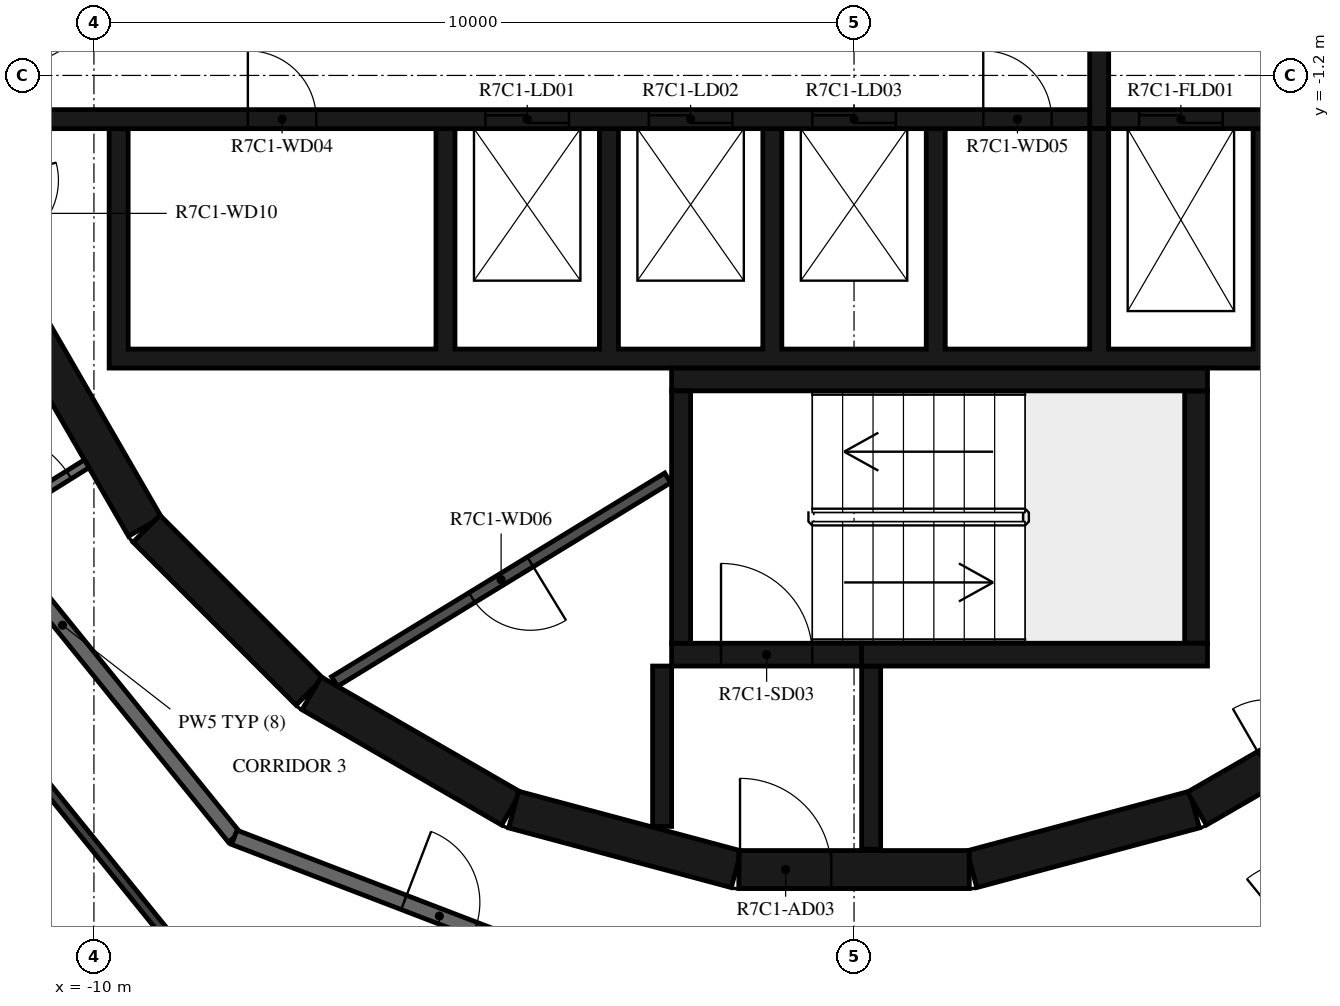
"""IFC4 building model, lengths in metres.
Left out: names, types, materials, properties, quantities, classifications, styles, units other than length and angle.
Written with IfcOpenShell. Run it as: python <this file> out.ifc"""

import sys

from ifc_helpers import new_model, si_unit, direction, frame, frame_2d, origin, place, context, subcontext, project, spatial, polyline, rectangle, outline, extrude, element, fill, save


model = new_model("IFC4")
c1 = context("Model", 3, precision=1e-05, world=origin(), true_north=direction((0.0, 1.0)))
c2 = subcontext(c1, "Body", "Model", "MODEL_VIEW")
j1 = project(units=[si_unit("LENGTHUNIT", "METRE"), si_unit("PLANEANGLEUNIT", "RADIAN")], contexts=[c1])
p1 = place(None, origin())
s1 = spatial("IfcSite", under=j1, at=p1, CompositionType="ELEMENT")
p2 = place(p1, origin())
s2 = spatial("IfcBuilding", under=s1, at=p2, CompositionType="ELEMENT")
p3 = place(p2, frame((0.0, 0.0, 287.9)))
s3 = spatial("IfcBuildingStorey", under=s2, at=p3, CompositionType="ELEMENT", Elevation=287.9)
p4 = place(p3, frame((1.55, -11.643, 0.0), z_axis=(0.0, 0.0, 1.0), x_axis=(0.965948410781, 0.258734743916, 0.0)))
e1 = element("IfcWall", 1, at=p4, inside=s3, PredefinedType="SHEAR", context=c2, shape_type="SweptSolid", body=[
    extrude(rectangle(XDim=3.033, YDim=0.5, at=frame_2d((1.516, 0.0))), origin(), (0.0, 0.0, 1.0), 3.05),
])
p5 = place(p3, frame((4.51, -10.845, 0.0), z_axis=(0.0, 0.0, 1.0), x_axis=(0.865975092491, 0.500087131594, 0.0)))
e2 = element("IfcWall", 2, at=p5, inside=s3, PredefinedType="SHEAR", context=c2, shape_type="SweptSolid", body=[
    extrude(rectangle(XDim=3.033, YDim=0.5, at=frame_2d((1.516, 0.0))), origin(), (0.0, 0.0, 1.0), 3.05),
])
p6 = place(p5, frame((1.066, 0.0, 0.0)))
e3 = element("IfcOpeningElement", 3, at=p6, cuts=e2, PredefinedType="OPENING", context=c2, shape_type="SweptSolid", body=[
    extrude(rectangle(XDim=0.9, YDim=2.1, at=frame_2d((0.45, 1.05))), frame((0.0, 0.26, 0.0), z_axis=(0.0, -1.0, 0.0), x_axis=(1.0, 0.0, 0.0)), (0.0, 0.0, 1.0), 0.52),
])
p7 = place(p3, frame((-10.845, -4.51, 0.0), z_axis=(0.0, 0.0, 1.0), x_axis=(0.500087131594, -0.865975092491, 0.0)))
e4 = element("IfcWall", 4, at=p7, inside=s3, PredefinedType="SHEAR", context=c2, shape_type="SweptSolid", body=[
    extrude(rectangle(XDim=3.033, YDim=0.5, at=frame_2d((1.516, 0.0))), origin(), (0.0, 0.0, 1.0), 3.05),
])
p8 = place(p3, frame((-9.308, -7.164, 0.0), z_axis=(0.0, 0.0, 1.0), x_axis=(0.707106781187, -0.707106781187, 0.0)))
e5 = element("IfcWall", 5, at=p8, inside=s3, PredefinedType="SHEAR", context=c2, shape_type="SweptSolid", body=[
    extrude(rectangle(XDim=3.032, YDim=0.5, at=frame_2d((1.516, 0.0))), origin(), (0.0, 0.0, 1.0), 3.05),
])
for number, where, z_axis, x_axis in (
    (6, (-7.137, -9.329, 0.0), (0.0, 0.0, 1.0), (0.866, -0.5, 0.0)),
    (7, (-4.479, -10.858, 0.0), (0.0, 0.0, 1.0), (0.966, -0.259, 0.0)),
):
    element("IfcWall", number, at=place(p3, frame(where, z_axis=z_axis, x_axis=x_axis)), inside=s3, PredefinedType="SHEAR", context=c2, shape_type="SweptSolid", body=[
        extrude(rectangle(XDim=3.033, YDim=0.5, at=frame_2d((1.516, 0.0))), origin(), (0.0, 0.0, 1.0), 3.05),
    ])
p9 = place(p3, frame((-1.516, -11.647, 0.0), z_axis=(0.0, 0.0, 1.0), x_axis=(1.0, 0.0, 0.0)))
e8 = element("IfcWall", 8, at=p9, inside=s3, PredefinedType="SHEAR", context=c2, shape_type="SweptSolid", body=[
    extrude(rectangle(XDim=3.033, YDim=0.5, at=frame_2d((1.516, 0.0))), origin(), (0.0, 0.0, 1.0), 3.05),
])
p10 = place(p9, frame((0.016, 0.0, 0.0)))
e9 = element("IfcOpeningElement", 9, at=p10, cuts=e8, PredefinedType="OPENING", context=c2, shape_type="SweptSolid", body=[
    extrude(rectangle(XDim=1.2, YDim=2.1, at=frame_2d((0.6, 1.05))), frame((0.0, 0.26, 0.0), z_axis=(0.0, -1.0, 0.0), x_axis=(1.0, 0.0, 0.0)), (0.0, 0.0, 1.0), 0.52),
])
p11 = place(p3, frame((-2.275, -8.67, 0.0), z_axis=(0.0, 0.0, 1.0), x_axis=(0.0, 1.0, 0.0)))
e10 = element("IfcWall", 10, at=p11, inside=s3, PredefinedType="SHEAR", context=c2, shape_type="SweptSolid", body=[
    extrude(rectangle(XDim=3.32, YDim=0.25, at=frame_2d((1.66, 0.0))), origin(), (0.0, 0.0, 1.0), 3.05),
])
p12 = place(p3, frame((-2.4, -5.2, 0.0), z_axis=(0.0, 0.0, 1.0), x_axis=(1.0, 0.0, 0.0)))
e11 = element("IfcWall", 11, at=p12, inside=s3, PredefinedType="SHEAR", context=c2, shape_type="SweptSolid", body=[
    extrude(rectangle(XDim=7.05, YDim=0.3, at=frame_2d((3.525, 0.0))), origin(), (0.0, 0.0, 1.0), 3.05),
])
p13 = place(p3, frame((4.5, -8.67, 0.0), z_axis=(0.0, 0.0, 1.0), x_axis=(0.0, 1.0, 0.0)))
e12 = element("IfcWall", 12, at=p13, inside=s3, PredefinedType="SHEAR", context=c2, shape_type="SweptSolid", body=[
    extrude(rectangle(XDim=3.32, YDim=0.3, at=frame_2d((1.66, 0.0))), origin(), (0.0, 0.0, 1.0), 3.05),
])
p14 = place(p3, frame((0.1, -8.82, 0.0), z_axis=(0.0, 0.0, 1.0), x_axis=(1.0, 0.0, 0.0)))
e13 = element("IfcWall", 13, at=p14, inside=s3, PredefinedType="SHEAR", context=c2, shape_type="SweptSolid", body=[
    extrude(rectangle(XDim=4.55, YDim=0.3, at=frame_2d((2.275, 0.0))), origin(), (0.0, 0.0, 1.0), 3.05),
])
p15 = place(p3, frame((-2.4, -8.82, 0.0), z_axis=(0.0, 0.0, 1.0), x_axis=(1.0, 0.0, 0.0)))
e14 = element("IfcWall", 14, at=p15, inside=s3, PredefinedType="SHEAR", context=c2, shape_type="SweptSolid", body=[
    extrude(rectangle(XDim=2.5, YDim=0.3, at=frame_2d((1.25, 0.0))), origin(), (0.0, 0.0, 1.0), 3.05),
])
p16 = place(p15, frame((0.65, 0.0, 0.0)))
e15 = element("IfcOpeningElement", 15, at=p16, cuts=e14, PredefinedType="OPENING", context=c2, shape_type="SweptSolid", body=[
    extrude(rectangle(XDim=1.2, YDim=2.1, at=frame_2d((0.6, 1.05))), frame((0.0, 0.16, 0.0), z_axis=(0.0, -1.0, 0.0), x_axis=(1.0, 0.0, 0.0)), (0.0, 0.0, 1.0), 0.32),
])
p17 = place(p3, frame((-2.525, -8.97, 0.0), z_axis=(0.0, 0.0, 1.0), x_axis=(0.0, -1.0, 0.0)))
e16 = element("IfcWall", 16, at=p17, inside=s3, PredefinedType="SHEAR", context=c2, shape_type="SweptSolid", body=[
    extrude(rectangle(XDim=2.11, YDim=0.25, at=frame_2d((1.055, 0.0))), origin(), (0.0, 0.0, 1.0), 3.05),
])
p18 = place(p3, frame((0.225, -8.97, 0.0), z_axis=(0.0, 0.0, 1.0), x_axis=(0.0, -1.0, 0.0)))
e17 = element("IfcWall", 17, at=p18, inside=s3, PredefinedType="SHEAR", context=c2, shape_type="SweptSolid", body=[
    extrude(rectangle(XDim=2.41, YDim=0.25, at=frame_2d((1.205, 0.0))), origin(), (0.0, 0.0, 1.0), 3.05),
])
p19 = place(p3, origin())
e18 = element("IfcWall", 18, at=p19, inside=s3, PredefinedType="SHEAR", context=c2, shape_type="SweptSolid", body=[
    extrude(outline(polyline([(9.8, -5.05), (9.8, -4.8), (9.8, -1.9), (9.55, -1.9), (9.55, -4.8), (7.65, -4.8), (7.65, -1.9), (7.4, -1.9), (7.4, -4.8), (5.5, -4.8), (5.5, -1.9), (5.25, -1.9), (5.25, -4.8), (3.35, -4.8), (3.35, -1.9), (3.1, -1.9), (3.1, -4.8), (1.2, -4.8), (1.2, -1.9), (0.95, -1.9), (0.95, -4.8), (-0.95, -4.8), (-0.95, -1.9), (-1.2, -1.9), (-1.2, -4.8), (-3.1, -4.8), (-3.1, -1.9), (-3.35, -1.9), (-3.35, -4.8), (-5.25, -4.8), (-5.25, -1.9), (-5.5, -1.9), (-5.5, -4.8), (-9.55, -4.8), (-9.55, -1.9), (-9.8, -1.9), (-9.8, -4.8), (-9.8, -5.05), (9.8, -5.05)])), origin(), (0.0, 0.0, 1.0), 3.05),
])
p20 = place(p3, frame((-11.28, -1.775, 0.0), z_axis=(0.0, 0.0, 1.0), x_axis=(1.0, 0.0, 0.0)))
e19 = element("IfcWall", 19, at=p20, inside=s3, PredefinedType="SHEAR", context=c2, shape_type="SweptSolid", body=[
    extrude(rectangle(XDim=14.38, YDim=0.25, at=frame_2d((7.19, 0.0))), origin(), (0.0, 0.0, 1.0), 3.05),
])
p21 = place(p20, frame((6.43, 0.0, 0.0)))
e20 = element("IfcOpeningElement", 20, at=p21, cuts=e19, PredefinedType="OPENING", context=c2, shape_type="SweptSolid", body=[
    extrude(rectangle(XDim=1.1, YDim=2.1, at=frame_2d((0.55, 1.05))), frame((0.0, 0.135, 0.0), z_axis=(0.0, -1.0, 0.0), x_axis=(1.0, 0.0, 0.0)), (0.0, 0.0, 1.0), 0.27),
])
p22 = place(p20, frame((8.58, 0.0, 0.0)))
e21 = element("IfcOpeningElement", 21, at=p22, cuts=e19, PredefinedType="OPENING", context=c2, shape_type="SweptSolid", body=[
    extrude(rectangle(XDim=1.1, YDim=2.1, at=frame_2d((0.55, 1.05))), frame((0.0, 0.135, 0.0), z_axis=(0.0, -1.0, 0.0), x_axis=(1.0, 0.0, 0.0)), (0.0, 0.0, 1.0), 0.27),
])
p23 = place(p20, frame((10.73, 0.0, 0.0)))
e22 = element("IfcOpeningElement", 22, at=p23, cuts=e19, PredefinedType="OPENING", context=c2, shape_type="SweptSolid", body=[
    extrude(rectangle(XDim=1.1, YDim=2.1, at=frame_2d((0.55, 1.05))), frame((0.0, 0.135, 0.0), z_axis=(0.0, -1.0, 0.0), x_axis=(1.0, 0.0, 0.0)), (0.0, 0.0, 1.0), 0.27),
])
p24 = place(p20, frame((3.305, 0.0, 0.0)))
e23 = element("IfcOpeningElement", 23, at=p24, cuts=e19, PredefinedType="OPENING", context=c2, shape_type="SweptSolid", body=[
    extrude(rectangle(XDim=0.9, YDim=2.1, at=frame_2d((0.45, 1.05))), frame((0.0, 0.135, 0.0), z_axis=(0.0, -1.0, 0.0), x_axis=(1.0, 0.0, 0.0)), (0.0, 0.0, 1.0), 0.27),
])
p25 = place(p20, frame((12.98, 0.0, 0.0)))
e24 = element("IfcOpeningElement", 24, at=p25, cuts=e19, PredefinedType="OPENING", context=c2, shape_type="SweptSolid", body=[
    extrude(rectangle(XDim=0.9, YDim=2.1, at=frame_2d((0.45, 1.05))), frame((0.0, 0.135, 0.0), z_axis=(0.0, -1.0, 0.0), x_axis=(1.0, 0.0, 0.0)), (0.0, 0.0, 1.0), 0.27),
])
p26 = place(p3, frame((3.35, -1.775, 0.0), z_axis=(0.0, 0.0, 1.0), x_axis=(1.0, 0.0, 0.0)))
e25 = element("IfcWall", 25, at=p26, inside=s3, PredefinedType="SHEAR", context=c2, shape_type="SweptSolid", body=[
    extrude(rectangle(XDim=7.93, YDim=0.25, at=frame_2d((3.965, 0.0))), origin(), (0.0, 0.0, 1.0), 3.05),
])
p27 = place(p26, frame((0.4, 0.0, 0.0)))
e26 = element("IfcOpeningElement", 26, at=p27, cuts=e25, PredefinedType="OPENING", context=c2, shape_type="SweptSolid", body=[
    extrude(rectangle(XDim=1.1, YDim=2.4, at=frame_2d((0.55, 1.2))), frame((0.0, 0.135, 0.0), z_axis=(0.0, -1.0, 0.0), x_axis=(1.0, 0.0, 0.0)), (0.0, 0.0, 1.0), 0.27),
])
p28 = place(p26, frame((2.55, 0.0, 0.0)))
e27 = element("IfcOpeningElement", 27, at=p28, cuts=e25, PredefinedType="OPENING", context=c2, shape_type="SweptSolid", body=[
    extrude(rectangle(XDim=1.1, YDim=2.4, at=frame_2d((0.55, 1.2))), frame((0.0, 0.135, 0.0), z_axis=(0.0, -1.0, 0.0), x_axis=(1.0, 0.0, 0.0)), (0.0, 0.0, 1.0), 0.27),
])
p29 = place(p26, frame((4.7, 0.0, 0.0)))
e28 = element("IfcOpeningElement", 28, at=p29, cuts=e25, PredefinedType="OPENING", context=c2, shape_type="SweptSolid", body=[
    extrude(rectangle(XDim=1.1, YDim=2.4, at=frame_2d((0.55, 1.2))), frame((0.0, 0.135, 0.0), z_axis=(0.0, -1.0, 0.0), x_axis=(1.0, 0.0, 0.0)), (0.0, 0.0, 1.0), 0.27),
])
p30 = place(p3, frame((3.225, -1.9, 0.0), z_axis=(0.0, 0.0, 1.0), x_axis=(0.0, 1.0, 0.0)))
e29 = element("IfcWall", 29, at=p30, inside=s3, PredefinedType="SHEAR", context=c2, shape_type="SweptSolid", body=[
    extrude(rectangle(XDim=3.8, YDim=0.25, at=frame_2d((1.9, 0.0))), origin(), (0.0, 0.0, 1.0), 3.05),
])
p31 = place(p3, frame((-2.451, -6.495, 0.0), z_axis=(0.0, 0.0, 1.0), x_axis=(-0.853250115418, -0.521501908471, 0.0)))
e30 = element("IfcWall", 30, at=p31, inside=s3, PredefinedType="PARTITIONING", context=c2, shape_type="SweptSolid", body=[
    extrude(rectangle(XDim=5.137, YDim=0.15, at=frame_2d((2.569, 0.0))), origin(), (0.0, 0.0, 1.0), 3.05),
])
p32 = place(p31, frame((2.119, 0.0, 0.0)))
e31 = element("IfcOpeningElement", 31, at=p32, cuts=e30, PredefinedType="OPENING", context=c2, shape_type="SweptSolid", body=[
    extrude(rectangle(XDim=0.9, YDim=2.1, at=frame_2d((0.45, 1.05))), frame((0.0, 0.085, 0.0), z_axis=(0.0, -1.0, 0.0), x_axis=(1.0, 0.0, 0.0)), (0.0, 0.0, 1.0), 0.17),
])
p33 = place(p3, frame((-11.449, -7.154, 0.0), z_axis=(0.0, 0.0, 1.0), x_axis=(0.848067047543, 0.529888934468, 0.0)))
e32 = element("IfcWall", 32, at=p33, inside=s3, PredefinedType="PARTITIONING", context=c2, shape_type="SweptSolid", body=[
    extrude(rectangle(XDim=1.596, YDim=0.12, at=frame_2d((0.798, 0.0))), origin(), (0.0, 0.0, 1.0), 3.05),
])
p34 = place(p33, frame((0.12, 0.0, 0.0)))
e33 = element("IfcOpeningElement", 33, at=p34, cuts=e32, PredefinedType="OPENING", context=c2, shape_type="SweptSolid", body=[
    extrude(rectangle(XDim=1.2, YDim=2.1, at=frame_2d((0.6, 1.05))), frame((0.0, 0.07, 0.0), z_axis=(0.0, -1.0, 0.0), x_axis=(1.0, 0.0, 0.0)), (0.0, 0.0, 1.0), 0.14),
])
p35 = place(p3, frame((-12.673, -5.643, 0.0), z_axis=(0.0, 0.0, 1.0), x_axis=(0.629302871585, -0.777160148113, 0.0)))
e34 = element("IfcWall", 34, at=p35, inside=s3, PredefinedType="STANDARD", context=c2, shape_type="SweptSolid", body=[
    extrude(rectangle(XDim=7.181, YDim=0.2, at=frame_2d((3.59, 0.0))), origin(), (0.0, 0.0, 1.0), 3.05),
])
p36 = place(p3, frame((-8.154, -11.223, 0.0), z_axis=(0.0, 0.0, 1.0), x_axis=(0.93359073609, -0.358341090983, 0.0)))
e35 = element("IfcWall", 35, at=p36, inside=s3, PredefinedType="STANDARD", context=c2, shape_type="SweptSolid", body=[
    extrude(rectangle(XDim=7.181, YDim=0.2, at=frame_2d((3.59, 0.0))), origin(), (0.0, 0.0, 1.0), 3.05),
])
p37 = place(p36, frame((2.39, 0.0, 0.0)))
e36 = element("IfcOpeningElement", 36, at=p37, cuts=e35, PredefinedType="OPENING", context=c2, shape_type="SweptSolid", body=[
    extrude(rectangle(XDim=1.0, YDim=2.1, at=frame_2d((0.5, 1.05))), frame((0.0, 0.11, 0.0), z_axis=(0.0, -1.0, 0.0), x_axis=(1.0, 0.0, 0.0)), (0.0, 0.0, 1.0), 0.22),
])
p38 = place(p3, frame((-11.795, -9.111, 0.0), z_axis=(0.0, 0.0, 1.0), x_axis=(0.62936834401, -0.777107127466, 0.0)))
e37 = element("IfcWall", 37, at=p38, inside=s3, PredefinedType="PARTITIONING", context=c2, shape_type="SweptSolid", body=[
    extrude(rectangle(XDim=4.334, YDim=0.12, at=frame_2d((2.167, 0.0))), origin(), (0.0, 0.0, 1.0), 3.05),
])
p39 = place(p38, frame((0.2, 0.0, 0.0)))
e38 = element("IfcOpeningElement", 38, at=p39, cuts=e37, PredefinedType="OPENING", context=c2, shape_type="SweptSolid", body=[
    extrude(rectangle(XDim=0.9, YDim=2.1, at=frame_2d((0.45, 1.05))), frame((0.0, 0.07, 0.0), z_axis=(0.0, -1.0, 0.0), x_axis=(1.0, 0.0, 0.0)), (0.0, 0.0, 1.0), 0.14),
])
p40 = place(p16, origin())
e39 = element("IfcDoor", 39, at=p40, inside=s3, OperationType="SINGLE_SWING_LEFT", PredefinedType="DOOR", context=c2, shape_type="SweptSolid", body=[
    extrude(rectangle(XDim=1.2, YDim=2.1, at=frame_2d((0.6, 1.05))), frame((0.0, 0.025, 0.0), z_axis=(0.0, -1.0, 0.0), x_axis=(1.0, 0.0, 0.0)), (0.0, 0.0, 1.0), 0.05),
])
fill(e15, e39)
p41 = place(p10, origin())
e40 = element("IfcDoor", 40, at=p41, inside=s3, OperationType="SINGLE_SWING_RIGHT", PredefinedType="DOOR", context=c2, shape_type="SweptSolid", body=[
    extrude(rectangle(XDim=1.2, YDim=2.1, at=frame_2d((0.6, 1.05))), frame((0.0, 0.025, 0.0), z_axis=(0.0, -1.0, 0.0), x_axis=(1.0, 0.0, 0.0)), (0.0, 0.0, 1.0), 0.05),
])
fill(e9, e40)
p42 = place(p21, origin())
e41 = element("IfcDoor", 41, at=p42, inside=s3, OperationType="DOUBLE_DOOR_SLIDING", PredefinedType="DOOR", context=c2, shape_type="SweptSolid", body=[
    extrude(rectangle(XDim=1.1, YDim=2.1, at=frame_2d((0.55, 1.05))), frame((0.0, 0.025, 0.0), z_axis=(0.0, -1.0, 0.0), x_axis=(1.0, 0.0, 0.0)), (0.0, 0.0, 1.0), 0.05),
])
fill(e20, e41)
p43 = place(p22, origin())
e42 = element("IfcDoor", 42, at=p43, inside=s3, OperationType="DOUBLE_DOOR_SLIDING", PredefinedType="DOOR", context=c2, shape_type="SweptSolid", body=[
    extrude(rectangle(XDim=1.1, YDim=2.1, at=frame_2d((0.55, 1.05))), frame((0.0, 0.025, 0.0), z_axis=(0.0, -1.0, 0.0), x_axis=(1.0, 0.0, 0.0)), (0.0, 0.0, 1.0), 0.05),
])
fill(e21, e42)
p44 = place(p23, origin())
e43 = element("IfcDoor", 43, at=p44, inside=s3, OperationType="DOUBLE_DOOR_SLIDING", PredefinedType="DOOR", context=c2, shape_type="SweptSolid", body=[
    extrude(rectangle(XDim=1.1, YDim=2.1, at=frame_2d((0.55, 1.05))), frame((0.0, 0.025, 0.0), z_axis=(0.0, -1.0, 0.0), x_axis=(1.0, 0.0, 0.0)), (0.0, 0.0, 1.0), 0.05),
])
fill(e22, e43)
p45 = place(p27, origin())
e44 = element("IfcDoor", 44, at=p45, inside=s3, OperationType="DOUBLE_DOOR_SLIDING", PredefinedType="DOOR", context=c2, shape_type="SweptSolid", body=[
    extrude(rectangle(XDim=1.1, YDim=2.4, at=frame_2d((0.55, 1.2))), frame((0.0, 0.025, 0.0), z_axis=(0.0, -1.0, 0.0), x_axis=(1.0, 0.0, 0.0)), (0.0, 0.0, 1.0), 0.05),
])
fill(e26, e44)
p46 = place(p24, origin())
e45 = element("IfcDoor", 45, at=p46, inside=s3, OperationType="SINGLE_SWING_RIGHT", PredefinedType="DOOR", context=c2, shape_type="SweptSolid", body=[
    extrude(rectangle(XDim=0.9, YDim=2.1, at=frame_2d((0.45, 1.05))), frame((0.0, 0.025, 0.0), z_axis=(0.0, -1.0, 0.0), x_axis=(1.0, 0.0, 0.0)), (0.0, 0.0, 1.0), 0.05),
])
fill(e23, e45)
p47 = place(p25, origin())
e46 = element("IfcDoor", 46, at=p47, inside=s3, OperationType="SINGLE_SWING_LEFT", PredefinedType="DOOR", context=c2, shape_type="SweptSolid", body=[
    extrude(rectangle(XDim=0.9, YDim=2.1, at=frame_2d((0.45, 1.05))), frame((0.0, 0.025, 0.0), z_axis=(0.0, -1.0, 0.0), x_axis=(1.0, 0.0, 0.0)), (0.0, 0.0, 1.0), 0.05),
])
fill(e24, e46)
p48 = place(p32, origin())
e47 = element("IfcDoor", 47, at=p48, inside=s3, OperationType="SINGLE_SWING_RIGHT", PredefinedType="DOOR", context=c2, shape_type="SweptSolid", body=[
    extrude(rectangle(XDim=0.9, YDim=2.1, at=frame_2d((0.45, 1.05))), frame((0.0, 0.025, 0.0), z_axis=(0.0, -1.0, 0.0), x_axis=(1.0, 0.0, 0.0)), (0.0, 0.0, 1.0), 0.05),
])
fill(e31, e47)
p49 = place(p37, origin())
e48 = element("IfcDoor", 48, at=p49, inside=s3, OperationType="SINGLE_SWING_RIGHT", PredefinedType="DOOR", context=c2, shape_type="SweptSolid", body=[
    extrude(rectangle(XDim=1.0, YDim=2.1, at=frame_2d((0.5, 1.05))), frame((0.0, 0.025, 0.0), z_axis=(0.0, -1.0, 0.0), x_axis=(1.0, 0.0, 0.0)), (0.0, 0.0, 1.0), 0.05),
])
fill(e36, e48)
p50 = place(p34, origin())
e49 = element("IfcDoor", 49, at=p50, inside=s3, OperationType="DOUBLE_DOOR_SINGLE_SWING", PredefinedType="DOOR", context=c2, shape_type="SweptSolid", body=[
    extrude(rectangle(XDim=1.2, YDim=2.1, at=frame_2d((0.6, 1.05))), frame((0.0, 0.025, 0.0), z_axis=(0.0, -1.0, 0.0), x_axis=(1.0, 0.0, 0.0)), (0.0, 0.0, 1.0), 0.05),
])
fill(e33, e49)
save(model, sys.argv[1])
